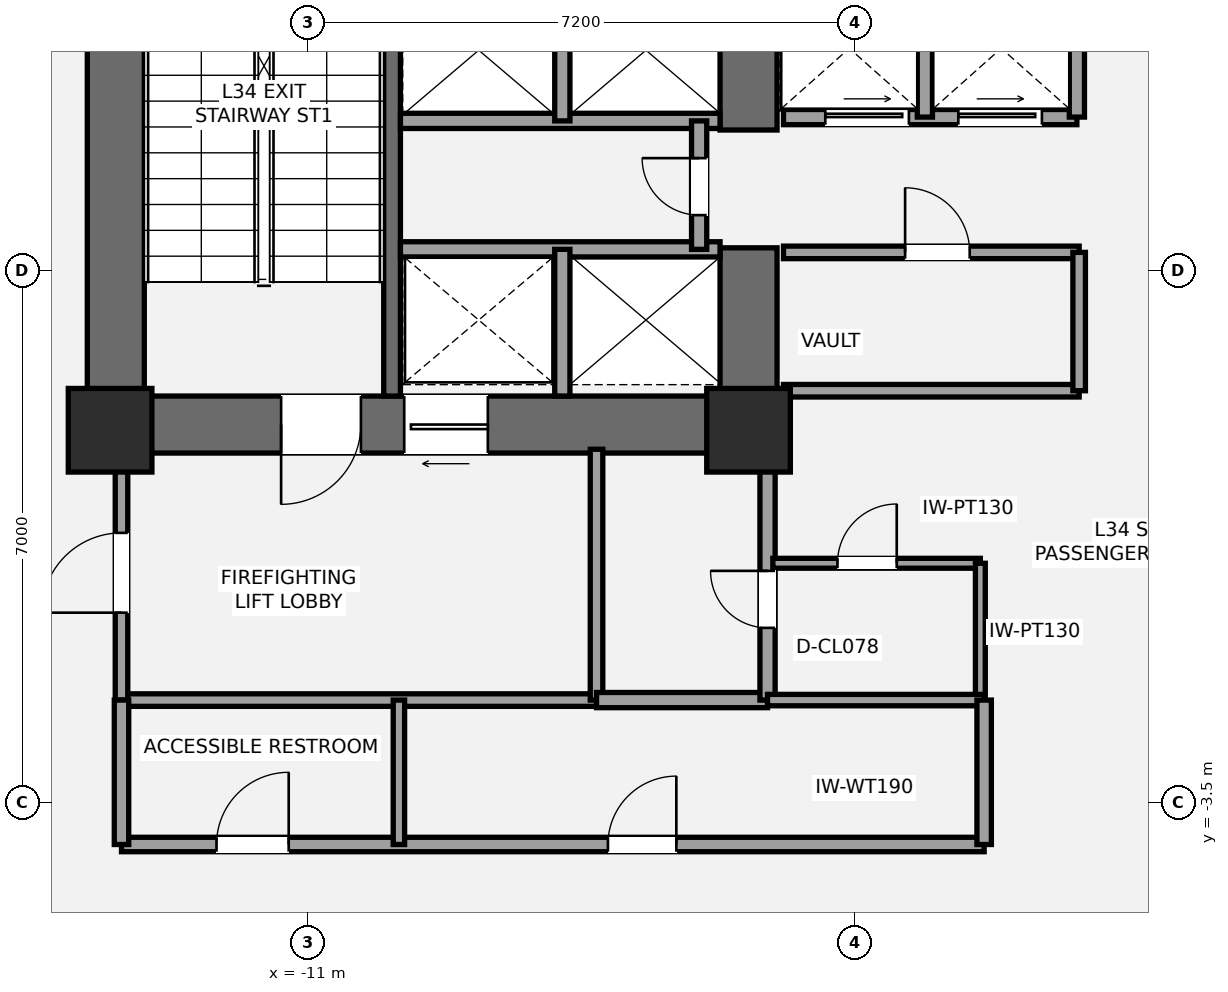
"""IFC4 building model, lengths in metres.
Left out: names, types, materials, properties, quantities, classifications, styles, units other than length and angle.
Written with IfcOpenShell. Run it as: python <this file> out.ifc"""

import sys

from ifc_helpers import new_model, si_unit, direction, frame, frame_2d, origin, origin_2d, place, context, subcontext, project, spatial, rectangle, extrude, element, fill, save


model = new_model("IFC4")
c1 = context("Model", 3, precision=1e-05, world=origin(), true_north=direction((0.0, 1.0)))
c2 = subcontext(c1, "Body", "Model", "MODEL_VIEW")
j1 = project(units=[si_unit("LENGTHUNIT", "METRE"), si_unit("PLANEANGLEUNIT", "RADIAN")], contexts=[c1])
p1 = place(None, origin())
s1 = spatial("IfcSite", under=j1, at=p1, CompositionType="ELEMENT")
p2 = place(p1, origin())
s2 = spatial("IfcBuilding", under=s1, at=p2, CompositionType="ELEMENT")
p3 = place(p2, frame((0.0, 0.0, 128.1)))
s3 = spatial("IfcBuildingStorey", under=s2, at=p3, CompositionType="ELEMENT", Elevation=128.1)
p4 = place(p3, frame((-13.525, 1.1, 0.0), z_axis=(0.0, 0.0, 1.0), x_axis=(0.0, 1.0, 0.0)))
e1 = element("IfcWall", 1, at=p4, inside=s3, PredefinedType="SHEAR", context=c2, shape_type="SweptSolid", body=[
    extrude(rectangle(XDim=8.65, YDim=0.75, at=frame_2d((4.325, 0.0))), origin(), (0.0, 0.0, 1.0), 3.5),
])
p5 = place(p3, frame((-4.825, 1.475, 0.0), z_axis=(0.0, 0.0, 1.0), x_axis=(-1.0, 0.0, 0.0)))
e2 = element("IfcWall", 2, at=p5, inside=s3, PredefinedType="SHEAR", context=c2, shape_type="SweptSolid", body=[
    extrude(rectangle(XDim=9.075, YDim=0.75, at=frame_2d((4.538, 0.0))), origin(), (0.0, 0.0, 1.0), 3.5),
])
p6 = place(p5, frame((5.475, 0.0, 0.0)))
e3 = element("IfcOpeningElement", 3, at=p6, cuts=e2, PredefinedType="OPENING", context=c2, shape_type="SweptSolid", body=[
    extrude(rectangle(XDim=1.05, YDim=2.15, at=frame_2d((0.525, 1.075))), frame((0.0, 0.385, 0.0), z_axis=(0.0, -1.0, 0.0), x_axis=(1.0, 0.0, 0.0)), (0.0, 0.0, 1.0), 0.77),
])
p7 = place(p5, frame((3.805, 0.0, 0.0)))
e4 = element("IfcOpeningElement", 4, at=p7, cuts=e2, PredefinedType="OPENING", context=c2, shape_type="SweptSolid", body=[
    extrude(rectangle(XDim=1.1, YDim=2.2, at=frame_2d((0.55, 1.1))), frame((0.0, 0.385, 0.0), z_axis=(0.0, -1.0, 0.0), x_axis=(1.0, 0.0, 0.0)), (0.0, 0.0, 1.0), 0.77),
])
p8 = place(p3, frame((-5.2, 1.1, 0.0), z_axis=(0.0, 0.0, 1.0), x_axis=(0.0, 1.0, 0.0)))
e5 = element("IfcWall", 5, at=p8, inside=s3, PredefinedType="SHEAR", context=c2, shape_type="SweptSolid", body=[
    extrude(rectangle(XDim=2.7, YDim=0.75, at=frame_2d((1.35, 0.0))), origin(), (0.0, 0.0, 1.0), 3.5),
])
p9 = place(p3, frame((-5.2, 5.35, 0.0), z_axis=(0.0, 0.0, 1.0), x_axis=(0.0, 1.0, 0.0)))
e6 = element("IfcWall", 6, at=p9, inside=s3, PredefinedType="SHEAR", context=c2, shape_type="SweptSolid", body=[
    extrude(rectangle(XDim=2.0, YDim=0.75, at=frame_2d((1.0, 0.0))), origin(), (0.0, 0.0, 1.0), 3.5),
])
p10 = place(p3, frame((-9.89, 1.85, 0.0), z_axis=(0.0, 0.0, 1.0), x_axis=(0.0, 1.0, 0.0)))
e7 = element("IfcWall", 7, at=p10, inside=s3, PredefinedType="SHEAR", context=c2, shape_type="SweptSolid", body=[
    extrude(rectangle(XDim=7.15, YDim=0.22, at=frame_2d((3.575, 0.0))), origin(), (0.0, 0.0, 1.0), 3.5),
])
for number, where, z_axis, x_axis in (
    (8, (-13.6, 1.4, 0.0), (0.0, 0.0, 1.0), (1.0, 0.0, 0.0)),
    (9, (-5.2, 1.4, 0.0), (0.0, 0.0, 1.0), (1.0, 0.0, 0.0)),
):
    element("IfcColumn", number, at=place(p3, frame(where, z_axis=z_axis, x_axis=x_axis)), inside=s3, PredefinedType="COLUMN", context=c2, shape_type="SweptSolid", body=[
        extrude(rectangle(XDim=1.1, YDim=1.1, at=origin_2d()), origin(), (0.0, 0.0, 1.0), 3.5),
    ])
p11 = place(p3, frame((-13.45, -2.15, 0.0), z_axis=(0.0, 0.0, 1.0), x_axis=(1.0, 0.0, 0.0)))
e10 = element("IfcWall", 10, at=p11, inside=s3, PredefinedType="PARTITIONING", context=c2, shape_type="SweptSolid", body=[
    extrude(rectangle(XDim=6.25, YDim=0.165, at=frame_2d((3.125, 0.0))), origin(), (0.0, 0.0, 1.0), 3.31),
])
p12 = place(p3, frame((-13.45, -2.15, 0.0), z_axis=(0.0, 0.0, 1.0), x_axis=(0.0, 1.0, 0.0)))
e11 = element("IfcWall", 11, at=p12, inside=s3, PredefinedType="PARTITIONING", context=c2, shape_type="SweptSolid", body=[
    extrude(rectangle(XDim=3.3, YDim=0.165, at=frame_2d((1.65, 0.0))), origin(), (0.0, 0.0, 1.0), 2.763),
])
p13 = place(p12, frame((1.15, 0.0, 0.0)))
e12 = element("IfcOpeningElement", 12, at=p13, cuts=e11, PredefinedType="OPENING", context=c2, shape_type="SweptSolid", body=[
    extrude(rectangle(XDim=1.05, YDim=2.15, at=frame_2d((0.525, 1.075))), frame((0.0, 0.093, 0.0), z_axis=(0.0, -1.0, 0.0), x_axis=(1.0, 0.0, 0.0)), (0.0, 0.0, 1.0), 0.185),
])
p14 = place(p3, frame((-7.2, -2.15, 0.0), z_axis=(0.0, 0.0, 1.0), x_axis=(0.0, 1.0, 0.0)))
e13 = element("IfcWall", 13, at=p14, inside=s3, PredefinedType="PARTITIONING", context=c2, shape_type="SweptSolid", body=[
    extrude(rectangle(XDim=3.3, YDim=0.165, at=frame_2d((1.65, 0.0))), origin(), (0.0, 0.0, 1.0), 2.763),
])
p15 = place(p3, frame((-7.2, -2.15, 0.0), z_axis=(0.0, 0.0, 1.0), x_axis=(1.0, 0.0, 0.0)))
e14 = element("IfcWall", 14, at=p15, inside=s3, PredefinedType="SOLIDWALL", context=c2, shape_type="SweptSolid", body=[
    extrude(rectangle(XDim=2.25, YDim=0.2, at=frame_2d((1.125, 0.0))), origin(), (0.0, 0.0, 1.0), 3.31),
])
p16 = place(p3, frame((-4.95, -2.15, 0.0), z_axis=(0.0, 0.0, 1.0), x_axis=(0.0, 1.0, 0.0)))
e15 = element("IfcWall", 15, at=p16, inside=s3, PredefinedType="SOLIDWALL", context=c2, shape_type="SweptSolid", body=[
    extrude(rectangle(XDim=3.3, YDim=0.2, at=frame_2d((1.65, 0.0))), origin(), (0.0, 0.0, 1.0), 2.763),
])
p17 = place(p16, frame((0.95, 0.0, 0.0)))
e16 = element("IfcOpeningElement", 16, at=p17, cuts=e15, PredefinedType="OPENING", context=c2, shape_type="SweptSolid", body=[
    extrude(rectangle(XDim=0.75, YDim=2.1, at=frame_2d((0.375, 1.05))), frame((0.0, 0.11, 0.0), z_axis=(0.0, -1.0, 0.0), x_axis=(1.0, 0.0, 0.0)), (0.0, 0.0, 1.0), 0.22),
])
p18 = place(p3, frame((-4.88, -0.35, 0.0), z_axis=(0.0, 0.0, 1.0), x_axis=(1.0, 0.0, 0.0)))
e17 = element("IfcWall", 17, at=p18, inside=s3, PredefinedType="PARTITIONING", context=c2, shape_type="SweptSolid", body=[
    extrude(rectangle(XDim=2.73, YDim=0.13, at=frame_2d((1.365, 0.0))), origin(), (0.0, 0.0, 1.0), 2.763),
])
p19 = place(p18, frame((0.85, 0.0, 0.0)))
e18 = element("IfcOpeningElement", 18, at=p19, cuts=e17, PredefinedType="OPENING", context=c2, shape_type="SweptSolid", body=[
    extrude(rectangle(XDim=0.78, YDim=2.1, at=frame_2d((0.39, 1.05))), frame((0.0, 0.075, 0.0), z_axis=(0.0, -1.0, 0.0), x_axis=(1.0, 0.0, 0.0)), (0.0, 0.0, 1.0), 0.15),
])
p20 = place(p3, frame((-2.15, -2.15, 0.0), z_axis=(0.0, 0.0, 1.0), x_axis=(0.0, 1.0, 0.0)))
e19 = element("IfcWall", 19, at=p20, inside=s3, PredefinedType="PARTITIONING", context=c2, shape_type="SweptSolid", body=[
    extrude(rectangle(XDim=1.8, YDim=0.13, at=frame_2d((0.9, 0.0))), origin(), (0.0, 0.0, 1.0), 2.763),
])
p21 = place(p3, frame((-9.78, 3.78, 0.0), z_axis=(0.0, 0.0, 1.0), x_axis=(1.0, 0.0, 0.0)))
e20 = element("IfcWall", 20, at=p21, inside=s3, PredefinedType="SOLIDWALL", context=c2, shape_type="SweptSolid", body=[
    extrude(rectangle(XDim=4.205, YDim=0.2, at=frame_2d((2.103, 0.0))), origin(), (0.0, 0.0, 1.0), 3.31),
])
p22 = place(p3, frame((-7.65, 1.85, 0.0), z_axis=(0.0, 0.0, 1.0), x_axis=(0.0, 1.0, 0.0)))
e21 = element("IfcWall", 21, at=p22, inside=s3, PredefinedType="SOLIDWALL", context=c2, shape_type="SweptSolid", body=[
    extrude(rectangle(XDim=1.93, YDim=0.2, at=frame_2d((0.965, 0.0))), origin(), (0.0, 0.0, 1.0), 3.31),
])
p23 = place(p3, frame((-9.78, 5.47, 0.0), z_axis=(0.0, 0.0, 1.0), x_axis=(1.0, 0.0, 0.0)))
e22 = element("IfcWall", 22, at=p23, inside=s3, PredefinedType="SOLIDWALL", context=c2, shape_type="SweptSolid", body=[
    extrude(rectangle(XDim=4.205, YDim=0.2, at=frame_2d((2.103, 0.0))), origin(), (0.0, 0.0, 1.0), 3.31),
])
p24 = place(p3, frame((-7.65, 5.47, 0.0), z_axis=(0.0, 0.0, 1.0), x_axis=(0.0, 1.0, 0.0)))
e23 = element("IfcWall", 23, at=p24, inside=s3, PredefinedType="SOLIDWALL", context=c2, shape_type="SweptSolid", body=[
    extrude(rectangle(XDim=1.86, YDim=0.2, at=frame_2d((0.93, 0.0))), origin(), (0.0, 0.0, 1.0), 3.31),
])
p25 = place(p3, frame((-5.85, 3.78, 0.0), z_axis=(0.0, 0.0, 1.0), x_axis=(0.0, 1.0, 0.0)))
e24 = element("IfcWall", 24, at=p25, inside=s3, PredefinedType="SOLIDWALL", context=c2, shape_type="SweptSolid", body=[
    extrude(rectangle(XDim=1.69, YDim=0.2, at=frame_2d((0.845, 0.0))), origin(), (0.0, 0.0, 1.0), 3.31),
])
p26 = place(p25, frame((0.45, 0.0, 0.0)))
e25 = element("IfcOpeningElement", 25, at=p26, cuts=e24, PredefinedType="OPENING", context=c2, shape_type="SweptSolid", body=[
    extrude(rectangle(XDim=0.75, YDim=2.1, at=frame_2d((0.375, 1.05))), frame((0.0, 0.11, 0.0), z_axis=(0.0, -1.0, 0.0), x_axis=(1.0, 0.0, 0.0)), (0.0, 0.0, 1.0), 0.22),
])
p27 = place(p3, frame((-4.74, 1.92, 0.0), z_axis=(0.0, 0.0, 1.0), x_axis=(1.0, 0.0, 0.0)))
e26 = element("IfcWall", 26, at=p27, inside=s3, PredefinedType="PARTITIONING", context=c2, shape_type="SweptSolid", body=[
    extrude(rectangle(XDim=3.89, YDim=0.165, at=frame_2d((1.945, 0.0))), origin(), (0.0, 0.0, 1.0), 2.3),
])
p28 = place(p3, frame((-4.74, 3.74, 0.0), z_axis=(0.0, 0.0, 1.0), x_axis=(1.0, 0.0, 0.0)))
e27 = element("IfcWall", 27, at=p28, inside=s3, PredefinedType="PARTITIONING", context=c2, shape_type="SweptSolid", body=[
    extrude(rectangle(XDim=3.89, YDim=0.165, at=frame_2d((1.945, 0.0))), origin(), (0.0, 0.0, 1.0), 3.31),
])
p29 = place(p28, frame((1.6, 0.0, 0.0)))
e28 = element("IfcOpeningElement", 28, at=p29, cuts=e27, PredefinedType="OPENING", context=c2, shape_type="SweptSolid", body=[
    extrude(rectangle(XDim=0.85, YDim=2.1, at=frame_2d((0.425, 1.05))), frame((0.0, 0.093, 0.0), z_axis=(0.0, -1.0, 0.0), x_axis=(1.0, 0.0, 0.0)), (0.0, 0.0, 1.0), 0.185),
])
p30 = place(p3, frame((-0.85, 1.92, 0.0), z_axis=(0.0, 0.0, 1.0), x_axis=(0.0, 1.0, 0.0)))
e29 = element("IfcWall", 29, at=p30, inside=s3, PredefinedType="PARTITIONING", context=c2, shape_type="SweptSolid", body=[
    extrude(rectangle(XDim=1.82, YDim=0.165, at=frame_2d((0.91, 0.0))), origin(), (0.0, 0.0, 1.0), 3.31),
])
p31 = place(p3, frame((-4.74, 5.52, 0.0), z_axis=(0.0, 0.0, 1.0), x_axis=(1.0, 0.0, 0.0)))
e30 = element("IfcWall", 30, at=p31, inside=s3, PredefinedType="SOLIDWALL", context=c2, shape_type="SweptSolid", body=[
    extrude(rectangle(XDim=3.86, YDim=0.2, at=frame_2d((1.93, 0.0))), origin(), (0.0, 0.0, 1.0), 3.31),
])
p32 = place(p31, frame((0.55, 0.0, 0.0)))
e31 = element("IfcOpeningElement", 31, at=p32, cuts=e30, PredefinedType="OPENING", context=c2, shape_type="SweptSolid", body=[
    extrude(rectangle(XDim=1.1, YDim=2.2, at=frame_2d((0.55, 1.1))), frame((0.0, 0.11, 0.0), z_axis=(0.0, -1.0, 0.0), x_axis=(1.0, 0.0, 0.0)), (0.0, 0.0, 1.0), 0.22),
])
p33 = place(p31, frame((2.3, 0.0, 0.0)))
e32 = element("IfcOpeningElement", 32, at=p33, cuts=e30, PredefinedType="OPENING", context=c2, shape_type="SweptSolid", body=[
    extrude(rectangle(XDim=1.1, YDim=2.2, at=frame_2d((0.55, 1.1))), frame((0.0, 0.11, 0.0), z_axis=(0.0, -1.0, 0.0), x_axis=(1.0, 0.0, 0.0)), (0.0, 0.0, 1.0), 0.22),
])
for number, where, z_axis, x_axis in (
    (33, (-2.88, 5.52, 0.0), (0.0, 0.0, 1.0), (0.0, 1.0, 0.0)),
    (34, (-0.88, 5.52, 0.0), (0.0, 0.0, 1.0), (0.0, 1.0, 0.0)),
):
    element("IfcWall", number, at=place(p3, frame(where, z_axis=z_axis, x_axis=x_axis)), inside=s3, PredefinedType="SOLIDWALL", context=c2, shape_type="SweptSolid", body=[
        extrude(rectangle(XDim=1.81, YDim=0.2, at=frame_2d((0.905, 0.0))), origin(), (0.0, 0.0, 1.0), 3.31),
    ])
p34 = place(p3, frame((-13.45, -4.05, 0.0), z_axis=(0.0, 0.0, 1.0), x_axis=(1.0, 0.0, 0.0)))
e35 = element("IfcWall", 35, at=p34, inside=s3, PredefinedType="PLUMBINGWALL", context=c2, shape_type="SweptSolid", body=[
    extrude(rectangle(XDim=11.35, YDim=0.19, at=frame_2d((5.675, 0.0))), origin(), (0.0, 0.0, 1.0), 2.843),
])
p35 = place(p34, frame((1.25, 0.0, 0.0)))
e36 = element("IfcOpeningElement", 36, at=p35, cuts=e35, PredefinedType="OPENING", context=c2, shape_type="SweptSolid", body=[
    extrude(rectangle(XDim=0.95, YDim=2.15, at=frame_2d((0.475, 1.075))), frame((0.0, 0.105, 0.0), z_axis=(0.0, -1.0, 0.0), x_axis=(1.0, 0.0, 0.0)), (0.0, 0.0, 1.0), 0.21),
])
p36 = place(p34, frame((6.4, 0.0, 0.0)))
e37 = element("IfcOpeningElement", 37, at=p36, cuts=e35, PredefinedType="OPENING", context=c2, shape_type="SweptSolid", body=[
    extrude(rectangle(XDim=0.9, YDim=2.1, at=frame_2d((0.45, 1.05))), frame((0.0, 0.105, 0.0), z_axis=(0.0, -1.0, 0.0), x_axis=(1.0, 0.0, 0.0)), (0.0, 0.0, 1.0), 0.21),
])
p37 = place(p3, frame((-4.95, -2.15, 0.0), z_axis=(0.0, 0.0, 1.0), x_axis=(1.0, 0.0, 0.0)))
e38 = element("IfcWall", 38, at=p37, inside=s3, PredefinedType="PLUMBINGWALL", context=c2, shape_type="SweptSolid", body=[
    extrude(rectangle(XDim=2.85, YDim=0.15, at=frame_2d((1.425, 0.0))), origin(), (0.0, 0.0, 1.0), 3.31),
])
p38 = place(p3, frame((-13.45, -4.05, 0.0), z_axis=(0.0, 0.0, 1.0), x_axis=(0.0, 1.0, 0.0)))
e39 = element("IfcWall", 39, at=p38, inside=s3, PredefinedType="PLUMBINGWALL", context=c2, shape_type="SweptSolid", body=[
    extrude(rectangle(XDim=1.9, YDim=0.19, at=frame_2d((0.95, 0.0))), origin(), (0.0, 0.0, 1.0), 2.763),
])
p39 = place(p3, frame((-2.1, -4.05, 0.0), z_axis=(0.0, 0.0, 1.0), x_axis=(0.0, 1.0, 0.0)))
e40 = element("IfcWall", 40, at=p39, inside=s3, PredefinedType="PLUMBINGWALL", context=c2, shape_type="SweptSolid", body=[
    extrude(rectangle(XDim=1.9, YDim=0.19, at=frame_2d((0.95, 0.0))), origin(), (0.0, 0.0, 1.0), 3.31),
])
p40 = place(p3, frame((-9.8, -4.05, 0.0), z_axis=(0.0, 0.0, 1.0), x_axis=(0.0, 1.0, 0.0)))
e41 = element("IfcWall", 41, at=p40, inside=s3, PredefinedType="PLUMBINGWALL", context=c2, shape_type="SweptSolid", body=[
    extrude(rectangle(XDim=1.9, YDim=0.15, at=frame_2d((0.95, 0.0))), origin(), (0.0, 0.0, 1.0), 3.31),
])
p41 = place(p6, origin())
e42 = element("IfcDoor", 42, at=p41, inside=s3, OperationType="SINGLE_SWING_RIGHT", PredefinedType="DOOR", context=c2, shape_type="SweptSolid", body=[
    extrude(rectangle(XDim=1.05, YDim=2.15, at=frame_2d((0.525, 1.075))), frame((0.0, 0.025, 0.0), z_axis=(0.0, -1.0, 0.0), x_axis=(1.0, 0.0, 0.0)), (0.0, 0.0, 1.0), 0.05),
])
fill(e3, e42)
p42 = place(p13, origin())
e43 = element("IfcDoor", 43, at=p42, inside=s3, OperationType="SINGLE_SWING_LEFT", PredefinedType="DOOR", context=c2, shape_type="SweptSolid", body=[
    extrude(rectangle(XDim=1.05, YDim=2.15, at=frame_2d((0.525, 1.075))), frame((0.0, 0.025, 0.0), z_axis=(0.0, -1.0, 0.0), x_axis=(1.0, 0.0, 0.0)), (0.0, 0.0, 1.0), 0.05),
])
fill(e12, e43)
p43 = place(p17, origin())
e44 = element("IfcDoor", 44, at=p43, inside=s3, OperationType="SINGLE_SWING_RIGHT", PredefinedType="DOOR", context=c2, shape_type="SweptSolid", body=[
    extrude(rectangle(XDim=0.75, YDim=2.1, at=frame_2d((0.375, 1.05))), frame((0.0, 0.025, 0.0), z_axis=(0.0, -1.0, 0.0), x_axis=(1.0, 0.0, 0.0)), (0.0, 0.0, 1.0), 0.05),
])
fill(e16, e44)
p44 = place(p19, origin())
e45 = element("IfcDoor", 45, at=p44, inside=s3, OperationType="SINGLE_SWING_RIGHT", PredefinedType="DOOR", context=c2, shape_type="SweptSolid", body=[
    extrude(rectangle(XDim=0.78, YDim=2.1, at=frame_2d((0.39, 1.05))), frame((0.0, 0.025, 0.0), z_axis=(0.0, -1.0, 0.0), x_axis=(1.0, 0.0, 0.0)), (0.0, 0.0, 1.0), 0.05),
])
fill(e18, e45)
p45 = place(p7, origin())
e46 = element("IfcDoor", 46, at=p45, inside=s3, OperationType="SLIDING_TO_LEFT", PredefinedType="DOOR", context=c2, shape_type="SweptSolid", body=[
    extrude(rectangle(XDim=1.1, YDim=2.2, at=frame_2d((0.55, 1.1))), frame((0.0, 0.025, 0.0), z_axis=(0.0, -1.0, 0.0), x_axis=(1.0, 0.0, 0.0)), (0.0, 0.0, 1.0), 0.05),
])
fill(e4, e46)
p46 = place(p26, origin())
e47 = element("IfcDoor", 47, at=p46, inside=s3, OperationType="SINGLE_SWING_RIGHT", PredefinedType="DOOR", context=c2, shape_type="SweptSolid", body=[
    extrude(rectangle(XDim=0.75, YDim=2.1, at=frame_2d((0.375, 1.05))), frame((0.0, 0.025, 0.0), z_axis=(0.0, -1.0, 0.0), x_axis=(1.0, 0.0, 0.0)), (0.0, 0.0, 1.0), 0.05),
])
fill(e25, e47)
p47 = place(p29, origin())
e48 = element("IfcDoor", 48, at=p47, inside=s3, OperationType="SINGLE_SWING_LEFT", PredefinedType="DOOR", context=c2, shape_type="SweptSolid", body=[
    extrude(rectangle(XDim=0.85, YDim=2.1, at=frame_2d((0.425, 1.05))), frame((0.0, 0.025, 0.0), z_axis=(0.0, -1.0, 0.0), x_axis=(1.0, 0.0, 0.0)), (0.0, 0.0, 1.0), 0.05),
])
fill(e28, e48)
p48 = place(p32, origin())
e49 = element("IfcDoor", 49, at=p48, inside=s3, OperationType="SLIDING_TO_LEFT", PredefinedType="DOOR", context=c2, shape_type="SweptSolid", body=[
    extrude(rectangle(XDim=1.1, YDim=2.2, at=frame_2d((0.55, 1.1))), frame((0.0, 0.025, 0.0), z_axis=(0.0, -1.0, 0.0), x_axis=(1.0, 0.0, 0.0)), (0.0, 0.0, 1.0), 0.05),
])
fill(e31, e49)
p49 = place(p33, origin())
e50 = element("IfcDoor", 50, at=p49, inside=s3, OperationType="SLIDING_TO_LEFT", PredefinedType="DOOR", context=c2, shape_type="SweptSolid", body=[
    extrude(rectangle(XDim=1.1, YDim=2.2, at=frame_2d((0.55, 1.1))), frame((0.0, 0.025, 0.0), z_axis=(0.0, -1.0, 0.0), x_axis=(1.0, 0.0, 0.0)), (0.0, 0.0, 1.0), 0.05),
])
fill(e32, e50)
p50 = place(p35, origin())
e51 = element("IfcDoor", 51, at=p50, inside=s3, OperationType="SINGLE_SWING_RIGHT", PredefinedType="DOOR", context=c2, shape_type="SweptSolid", body=[
    extrude(rectangle(XDim=0.95, YDim=2.15, at=frame_2d((0.475, 1.075))), frame((0.0, 0.025, 0.0), z_axis=(0.0, -1.0, 0.0), x_axis=(1.0, 0.0, 0.0)), (0.0, 0.0, 1.0), 0.05),
])
fill(e36, e51)
p51 = place(p36, origin())
e52 = element("IfcDoor", 52, at=p51, inside=s3, OperationType="SINGLE_SWING_RIGHT", PredefinedType="DOOR", context=c2, shape_type="SweptSolid", body=[
    extrude(rectangle(XDim=0.9, YDim=2.1, at=frame_2d((0.45, 1.05))), frame((0.0, 0.025, 0.0), z_axis=(0.0, -1.0, 0.0), x_axis=(1.0, 0.0, 0.0)), (0.0, 0.0, 1.0), 0.05),
])
fill(e37, e52)
save(model, sys.argv[1])
